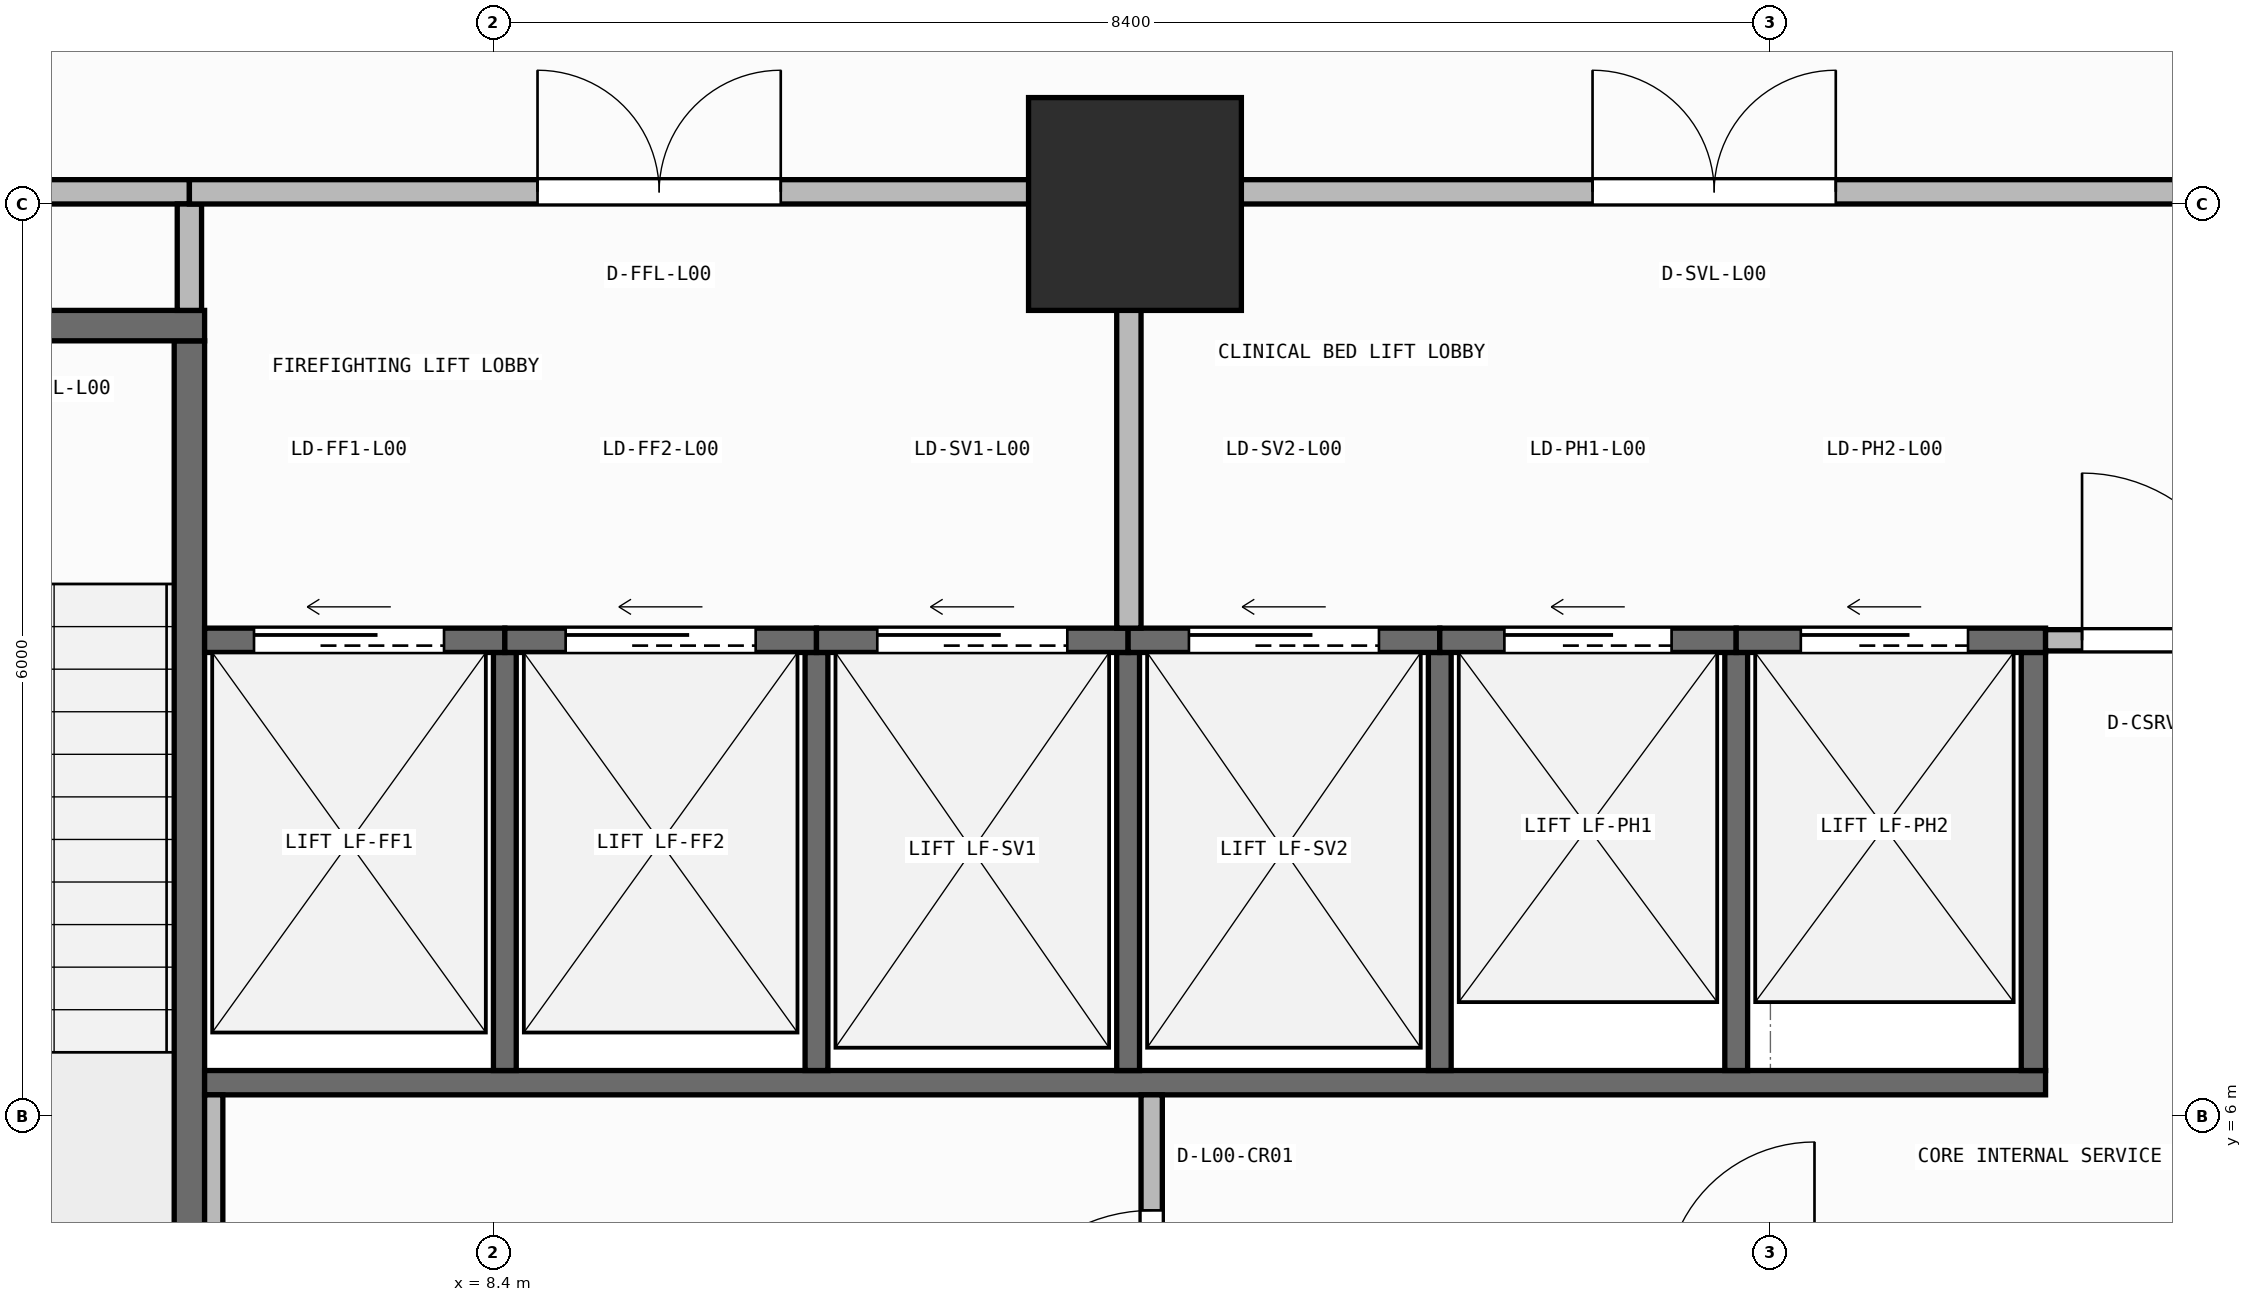
"""IFC4 building model, lengths in metres.
Left out: names, types, materials, properties, quantities, classifications, styles, units other than length and angle.
Written with IfcOpenShell. Run it as: python <this file> out.ifc"""

import sys

from ifc_helpers import new_model, si_unit, direction, frame, frame_2d, origin, origin_2d, place, context, subcontext, project, spatial, rectangle, extrude, element, fill, save


model = new_model("IFC4")
c1 = context("Model", 3, precision=1e-05, world=origin(), true_north=direction((0.0, 1.0)))
c2 = subcontext(c1, "Body", "Model", "MODEL_VIEW")
j1 = project(units=[si_unit("LENGTHUNIT", "METRE"), si_unit("PLANEANGLEUNIT", "RADIAN")], contexts=[c1])
p1 = place(None, origin())
s1 = spatial("IfcSite", under=j1, at=p1, CompositionType="ELEMENT")
p2 = place(p1, origin())
s2 = spatial("IfcBuilding", under=s1, at=p2, CompositionType="ELEMENT")
p3 = place(p2, origin())
s3 = spatial("IfcBuildingStorey", under=s2, at=p3, CompositionType="ELEMENT", Elevation=0.0)
p4 = place(p3, frame((12.62, 12.0, 0.0), z_axis=(0.0, 0.0, 1.0), x_axis=(1.0, 0.0, 0.0)))
e1 = element("IfcColumn", 1, at=p4, inside=s3, PredefinedType="COLUMN", context=c2, shape_type="SweptSolid", body=[
    extrude(rectangle(XDim=1.4, YDim=1.4, at=origin_2d()), origin(), (0.0, 0.0, 1.0), 4.5),
])
p5 = place(p3, frame((6.4, 3.5, 0.0), z_axis=(0.0, 0.0, 1.0), x_axis=(0.0, 1.0, 0.0)))
e2 = element("IfcWall", 2, at=p5, inside=s3, PredefinedType="SHEAR", context=c2, shape_type="SweptSolid", body=[
    extrude(rectangle(XDim=7.6, YDim=0.2, at=frame_2d((3.8, 0.0))), origin(), (0.0, 0.0, 1.0), 4.25),
])
p6 = place(p3, frame((2.8, 11.2, 0.0), z_axis=(0.0, 0.0, 1.0), x_axis=(1.0, 0.0, 0.0)))
e3 = element("IfcWall", 3, at=p6, inside=s3, PredefinedType="SHEAR", context=c2, shape_type="SweptSolid", body=[
    extrude(rectangle(XDim=3.7, YDim=0.2, at=frame_2d((1.85, 0.0))), origin(), (0.0, 0.0, 1.0), 4.25),
])
p7 = place(p6, frame((1.2, 0.0, 0.0)))
e4 = element("IfcOpeningElement", 4, at=p7, cuts=e3, PredefinedType="OPENING", context=c2, shape_type="SweptSolid", body=[
    extrude(rectangle(XDim=1.3, YDim=2.15, at=frame_2d((0.65, 1.075))), frame((0.0, 0.11, 0.0), z_axis=(0.0, -1.0, 0.0), x_axis=(1.0, 0.0, 0.0)), (0.0, 0.0, 1.0), 0.22),
])
p8 = place(p3, frame((6.5, 6.22, 0.0), z_axis=(0.0, 0.0, 1.0), x_axis=(1.0, 0.0, 0.0)))
e5 = element("IfcWall", 5, at=p8, inside=s3, PredefinedType="SHEAR", context=c2, shape_type="SweptSolid", body=[
    extrude(rectangle(XDim=12.11, YDim=0.16, at=frame_2d((6.055, 0.0))), origin(), (0.0, 0.0, 1.0), 4.25),
])
p9 = place(p3, frame((18.53, 6.3, 0.0), z_axis=(0.0, 0.0, 1.0), x_axis=(0.0, 1.0, 0.0)))
e6 = element("IfcWall", 6, at=p9, inside=s3, PredefinedType="SHEAR", context=c2, shape_type="SweptSolid", body=[
    extrude(rectangle(XDim=2.75, YDim=0.16, at=frame_2d((1.375, 0.0))), origin(), (0.0, 0.0, 1.0), 4.25),
])
for number, where, z_axis, x_axis in (
    (7, (8.475, 6.3, 0.0), (0.0, 0.0, 1.0), (0.0, 1.0, 0.0)),
    (8, (10.525, 6.3, 0.0), (0.0, 0.0, 1.0), (0.0, 1.0, 0.0)),
    (9, (12.575, 6.3, 0.0), (0.0, 0.0, 1.0), (0.0, 1.0, 0.0)),
    (10, (14.625, 6.3, 0.0), (0.0, 0.0, 1.0), (0.0, 1.0, 0.0)),
    (11, (16.575, 6.3, 0.0), (0.0, 0.0, 1.0), (0.0, 1.0, 0.0)),
):
    element("IfcWall", number, at=place(p3, frame(where, z_axis=z_axis, x_axis=x_axis)), inside=s3, PredefinedType="SHEAR", context=c2, shape_type="SweptSolid", body=[
        extrude(rectangle(XDim=2.75, YDim=0.15, at=frame_2d((1.375, 0.0))), origin(), (0.0, 0.0, 1.0), 4.25),
    ])
p10 = place(p3, frame((6.5, 9.13, 0.0), z_axis=(0.0, 0.0, 1.0), x_axis=(1.0, 0.0, 0.0)))
e12 = element("IfcWall", 12, at=p10, inside=s3, PredefinedType="SHEAR", context=c2, shape_type="SweptSolid", body=[
    extrude(rectangle(XDim=1.975, YDim=0.16, at=frame_2d((0.988, 0.0))), origin(), (0.0, 0.0, 1.0), 4.25),
])
p11 = place(p10, frame((0.325, 0.0, 0.0)))
e13 = element("IfcOpeningElement", 13, at=p11, cuts=e12, PredefinedType="OPENING", context=c2, shape_type="SweptSolid", body=[
    extrude(rectangle(XDim=1.25, YDim=2.15, at=frame_2d((0.625, 1.075))), frame((0.0, 0.09, 0.0), z_axis=(0.0, -1.0, 0.0), x_axis=(1.0, 0.0, 0.0)), (0.0, 0.0, 1.0), 0.18),
])
p12 = place(p3, frame((8.475, 9.13, 0.0), z_axis=(0.0, 0.0, 1.0), x_axis=(1.0, 0.0, 0.0)))
e14 = element("IfcWall", 14, at=p12, inside=s3, PredefinedType="SHEAR", context=c2, shape_type="SweptSolid", body=[
    extrude(rectangle(XDim=2.05, YDim=0.16, at=frame_2d((1.025, 0.0))), origin(), (0.0, 0.0, 1.0), 4.25),
])
p13 = place(p12, frame((0.4, 0.0, 0.0)))
e15 = element("IfcOpeningElement", 15, at=p13, cuts=e14, PredefinedType="OPENING", context=c2, shape_type="SweptSolid", body=[
    extrude(rectangle(XDim=1.25, YDim=2.15, at=frame_2d((0.625, 1.075))), frame((0.0, 0.09, 0.0), z_axis=(0.0, -1.0, 0.0), x_axis=(1.0, 0.0, 0.0)), (0.0, 0.0, 1.0), 0.18),
])
p14 = place(p3, frame((10.525, 9.13, 0.0), z_axis=(0.0, 0.0, 1.0), x_axis=(1.0, 0.0, 0.0)))
e16 = element("IfcWall", 16, at=p14, inside=s3, PredefinedType="SHEAR", context=c2, shape_type="SweptSolid", body=[
    extrude(rectangle(XDim=2.05, YDim=0.16, at=frame_2d((1.025, 0.0))), origin(), (0.0, 0.0, 1.0), 4.25),
])
p15 = place(p14, frame((0.4, 0.0, 0.0)))
e17 = element("IfcOpeningElement", 17, at=p15, cuts=e16, PredefinedType="OPENING", context=c2, shape_type="SweptSolid", body=[
    extrude(rectangle(XDim=1.25, YDim=2.15, at=frame_2d((0.625, 1.075))), frame((0.0, 0.09, 0.0), z_axis=(0.0, -1.0, 0.0), x_axis=(1.0, 0.0, 0.0)), (0.0, 0.0, 1.0), 0.18),
])
p16 = place(p3, frame((12.575, 9.13, 0.0), z_axis=(0.0, 0.0, 1.0), x_axis=(1.0, 0.0, 0.0)))
e18 = element("IfcWall", 18, at=p16, inside=s3, PredefinedType="SHEAR", context=c2, shape_type="SweptSolid", body=[
    extrude(rectangle(XDim=2.05, YDim=0.16, at=frame_2d((1.025, 0.0))), origin(), (0.0, 0.0, 1.0), 4.25),
])
p17 = place(p16, frame((0.4, 0.0, 0.0)))
e19 = element("IfcOpeningElement", 19, at=p17, cuts=e18, PredefinedType="OPENING", context=c2, shape_type="SweptSolid", body=[
    extrude(rectangle(XDim=1.25, YDim=2.15, at=frame_2d((0.625, 1.075))), frame((0.0, 0.09, 0.0), z_axis=(0.0, -1.0, 0.0), x_axis=(1.0, 0.0, 0.0)), (0.0, 0.0, 1.0), 0.18),
])
p18 = place(p3, frame((14.625, 9.13, 0.0), z_axis=(0.0, 0.0, 1.0), x_axis=(1.0, 0.0, 0.0)))
e20 = element("IfcWall", 20, at=p18, inside=s3, PredefinedType="SHEAR", context=c2, shape_type="SweptSolid", body=[
    extrude(rectangle(XDim=1.95, YDim=0.16, at=frame_2d((0.975, 0.0))), origin(), (0.0, 0.0, 1.0), 4.25),
])
p19 = place(p18, frame((0.425, 0.0, 0.0)))
e21 = element("IfcOpeningElement", 21, at=p19, cuts=e20, PredefinedType="OPENING", context=c2, shape_type="SweptSolid", body=[
    extrude(rectangle(XDim=1.1, YDim=2.15, at=frame_2d((0.55, 1.075))), frame((0.0, 0.09, 0.0), z_axis=(0.0, -1.0, 0.0), x_axis=(1.0, 0.0, 0.0)), (0.0, 0.0, 1.0), 0.18),
])
p20 = place(p3, frame((16.575, 9.13, 0.0), z_axis=(0.0, 0.0, 1.0), x_axis=(1.0, 0.0, 0.0)))
e22 = element("IfcWall", 22, at=p20, inside=s3, PredefinedType="SHEAR", context=c2, shape_type="SweptSolid", body=[
    extrude(rectangle(XDim=2.035, YDim=0.16, at=frame_2d((1.018, 0.0))), origin(), (0.0, 0.0, 1.0), 4.25),
])
p21 = place(p20, frame((0.425, 0.0, 0.0)))
e23 = element("IfcOpeningElement", 23, at=p21, cuts=e22, PredefinedType="OPENING", context=c2, shape_type="SweptSolid", body=[
    extrude(rectangle(XDim=1.1, YDim=2.15, at=frame_2d((0.55, 1.075))), frame((0.0, 0.09, 0.0), z_axis=(0.0, -1.0, 0.0), x_axis=(1.0, 0.0, 0.0)), (0.0, 0.0, 1.0), 0.18),
])
p22 = place(p3, frame((6.56, 3.52, 0.0), z_axis=(0.0, 0.0, 1.0), x_axis=(0.0, 1.0, 0.0)))
e24 = element("IfcWall", 24, at=p22, inside=s3, PredefinedType="PARTITIONING", context=c2, shape_type="SweptSolid", body=[
    extrude(rectangle(XDim=2.62, YDim=0.12, at=frame_2d((1.31, 0.0))), origin(), (0.0, 0.0, 1.0), 4.25),
])
p23 = place(p3, frame((12.73, 3.52, 0.0), z_axis=(0.0, 0.0, 1.0), x_axis=(0.0, 1.0, 0.0)))
e25 = element("IfcWall", 25, at=p23, inside=s3, PredefinedType="PARTITIONING", context=c2, shape_type="SweptSolid", body=[
    extrude(rectangle(XDim=2.62, YDim=0.14, at=frame_2d((1.31, 0.0))), origin(), (0.0, 0.0, 1.0), 4.25),
])
p24 = place(p23, frame((0.76, 0.0, 0.0)))
e26 = element("IfcOpeningElement", 26, at=p24, cuts=e25, PredefinedType="OPENING", context=c2, shape_type="SweptSolid", body=[
    extrude(rectangle(XDim=1.1, YDim=2.1, at=frame_2d((0.55, 1.05))), frame((0.0, 0.08, 0.0), z_axis=(0.0, -1.0, 0.0), x_axis=(1.0, 0.0, 0.0)), (0.0, 0.0, 1.0), 0.16),
])
p25 = place(p3, frame((18.61, 9.13, 0.0), z_axis=(0.0, 0.0, 1.0), x_axis=(1.0, 0.0, 0.0)))
e27 = element("IfcWall", 27, at=p25, inside=s3, PredefinedType="PARTITIONING", context=c2, shape_type="SweptSolid", body=[
    extrude(rectangle(XDim=1.59, YDim=0.14, at=frame_2d((0.795, 0.0))), origin(), (0.0, 0.0, 1.0), 4.25),
])
p26 = place(p25, frame((0.24, 0.0, 0.0)))
e28 = element("IfcOpeningElement", 28, at=p26, cuts=e27, PredefinedType="OPENING", context=c2, shape_type="SweptSolid", body=[
    extrude(rectangle(XDim=1.1, YDim=2.1, at=frame_2d((0.55, 1.05))), frame((0.0, 0.08, 0.0), z_axis=(0.0, -1.0, 0.0), x_axis=(1.0, 0.0, 0.0)), (0.0, 0.0, 1.0), 0.16),
])
p27 = place(p3, frame((2.8, 12.08, 0.0), z_axis=(0.0, 0.0, 1.0), x_axis=(1.0, 0.0, 0.0)))
e29 = element("IfcWall", 29, at=p27, inside=s3, PredefinedType="PARTITIONING", context=c2, shape_type="SweptSolid", body=[
    extrude(rectangle(XDim=3.6, YDim=0.16, at=frame_2d((1.8, 0.0))), origin(), (0.0, 0.0, 1.0), 3.425),
])
p28 = place(p27, frame((1.0, 0.0, 0.0)))
e30 = element("IfcOpeningElement", 30, at=p28, cuts=e29, PredefinedType="OPENING", context=c2, shape_type="SweptSolid", body=[
    extrude(rectangle(XDim=1.6, YDim=2.05, at=frame_2d((0.8, 1.025))), frame((0.0, 0.09, 0.0), z_axis=(0.0, -1.0, 0.0), x_axis=(1.0, 0.0, 0.0)), (0.0, 0.0, 1.0), 0.18),
])
p29 = place(p3, frame((6.4, 11.3, 0.0), z_axis=(0.0, 0.0, 1.0), x_axis=(0.0, 1.0, 0.0)))
e31 = element("IfcWall", 31, at=p29, inside=s3, PredefinedType="PARTITIONING", context=c2, shape_type="SweptSolid", body=[
    extrude(rectangle(XDim=0.7, YDim=0.16, at=frame_2d((0.35, 0.0))), origin(), (0.0, 0.0, 1.0), 4.25),
])
p30 = place(p3, frame((6.4, 12.08, 0.0), z_axis=(0.0, 0.0, 1.0), x_axis=(1.0, 0.0, 0.0)))
e32 = element("IfcWall", 32, at=p30, inside=s3, PredefinedType="PARTITIONING", context=c2, shape_type="SweptSolid", body=[
    extrude(rectangle(XDim=6.18, YDim=0.16, at=frame_2d((3.09, 0.0))), origin(), (0.0, 0.0, 1.0), 3.425),
])
p31 = place(p30, frame((2.29, 0.0, 0.0)))
e33 = element("IfcOpeningElement", 33, at=p31, cuts=e32, PredefinedType="OPENING", context=c2, shape_type="SweptSolid", body=[
    extrude(rectangle(XDim=1.6, YDim=2.05, at=frame_2d((0.8, 1.025))), frame((0.0, 0.09, 0.0), z_axis=(0.0, -1.0, 0.0), x_axis=(1.0, 0.0, 0.0)), (0.0, 0.0, 1.0), 0.18),
])
p32 = place(p3, frame((12.58, 9.21, 0.0), z_axis=(0.0, 0.0, 1.0), x_axis=(0.0, 1.0, 0.0)))
e34 = element("IfcWall", 34, at=p32, inside=s3, PredefinedType="PARTITIONING", context=c2, shape_type="SweptSolid", body=[
    extrude(rectangle(XDim=2.79, YDim=0.16, at=frame_2d((1.395, 0.0))), origin(), (0.0, 0.0, 1.0), 4.25),
])
p33 = place(p3, frame((12.58, 12.08, 0.0), z_axis=(0.0, 0.0, 1.0), x_axis=(1.0, 0.0, 0.0)))
e35 = element("IfcWall", 35, at=p33, inside=s3, PredefinedType="PARTITIONING", context=c2, shape_type="SweptSolid", body=[
    extrude(rectangle(XDim=7.7, YDim=0.16, at=frame_2d((3.85, 0.0))), origin(), (0.0, 0.0, 1.0), 3.425),
])
p34 = place(p33, frame((3.05, 0.0, 0.0)))
e36 = element("IfcOpeningElement", 36, at=p34, cuts=e35, PredefinedType="OPENING", context=c2, shape_type="SweptSolid", body=[
    extrude(rectangle(XDim=1.6, YDim=2.05, at=frame_2d((0.8, 1.025))), frame((0.0, 0.09, 0.0), z_axis=(0.0, -1.0, 0.0), x_axis=(1.0, 0.0, 0.0)), (0.0, 0.0, 1.0), 0.18),
])
p35 = place(p11, origin())
e37 = element("IfcDoor", 37, at=p35, inside=s3, OperationType="SLIDING_TO_LEFT", PredefinedType="DOOR", context=c2, shape_type="SweptSolid", body=[
    extrude(rectangle(XDim=1.25, YDim=2.15, at=frame_2d((0.625, 1.075))), frame((0.0, 0.025, 0.0), z_axis=(0.0, -1.0, 0.0), x_axis=(1.0, 0.0, 0.0)), (0.0, 0.0, 1.0), 0.05),
])
fill(e13, e37)
p36 = place(p13, origin())
e38 = element("IfcDoor", 38, at=p36, inside=s3, OperationType="SLIDING_TO_LEFT", PredefinedType="DOOR", context=c2, shape_type="SweptSolid", body=[
    extrude(rectangle(XDim=1.25, YDim=2.15, at=frame_2d((0.625, 1.075))), frame((0.0, 0.025, 0.0), z_axis=(0.0, -1.0, 0.0), x_axis=(1.0, 0.0, 0.0)), (0.0, 0.0, 1.0), 0.05),
])
fill(e15, e38)
p37 = place(p15, origin())
e39 = element("IfcDoor", 39, at=p37, inside=s3, OperationType="SLIDING_TO_LEFT", PredefinedType="DOOR", context=c2, shape_type="SweptSolid", body=[
    extrude(rectangle(XDim=1.25, YDim=2.15, at=frame_2d((0.625, 1.075))), frame((0.0, 0.025, 0.0), z_axis=(0.0, -1.0, 0.0), x_axis=(1.0, 0.0, 0.0)), (0.0, 0.0, 1.0), 0.05),
])
fill(e17, e39)
p38 = place(p17, origin())
e40 = element("IfcDoor", 40, at=p38, inside=s3, OperationType="SLIDING_TO_LEFT", PredefinedType="DOOR", context=c2, shape_type="SweptSolid", body=[
    extrude(rectangle(XDim=1.25, YDim=2.15, at=frame_2d((0.625, 1.075))), frame((0.0, 0.025, 0.0), z_axis=(0.0, -1.0, 0.0), x_axis=(1.0, 0.0, 0.0)), (0.0, 0.0, 1.0), 0.05),
])
fill(e19, e40)
p39 = place(p19, origin())
e41 = element("IfcDoor", 41, at=p39, inside=s3, OperationType="SLIDING_TO_LEFT", PredefinedType="DOOR", context=c2, shape_type="SweptSolid", body=[
    extrude(rectangle(XDim=1.1, YDim=2.15, at=frame_2d((0.55, 1.075))), frame((0.0, 0.025, 0.0), z_axis=(0.0, -1.0, 0.0), x_axis=(1.0, 0.0, 0.0)), (0.0, 0.0, 1.0), 0.05),
])
fill(e21, e41)
p40 = place(p21, origin())
e42 = element("IfcDoor", 42, at=p40, inside=s3, OperationType="SLIDING_TO_LEFT", PredefinedType="DOOR", context=c2, shape_type="SweptSolid", body=[
    extrude(rectangle(XDim=1.1, YDim=2.15, at=frame_2d((0.55, 1.075))), frame((0.0, 0.025, 0.0), z_axis=(0.0, -1.0, 0.0), x_axis=(1.0, 0.0, 0.0)), (0.0, 0.0, 1.0), 0.05),
])
fill(e23, e42)
p41 = place(p24, origin())
e43 = element("IfcDoor", 43, at=p41, inside=s3, OperationType="SINGLE_SWING_LEFT", PredefinedType="DOOR", context=c2, shape_type="SweptSolid", body=[
    extrude(rectangle(XDim=1.1, YDim=2.1, at=frame_2d((0.55, 1.05))), frame((0.0, 0.025, 0.0), z_axis=(0.0, -1.0, 0.0), x_axis=(1.0, 0.0, 0.0)), (0.0, 0.0, 1.0), 0.05),
])
fill(e26, e43)
p42 = place(p26, origin())
e44 = element("IfcDoor", 44, at=p42, inside=s3, OperationType="SINGLE_SWING_LEFT", PredefinedType="DOOR", context=c2, shape_type="SweptSolid", body=[
    extrude(rectangle(XDim=1.1, YDim=2.1, at=frame_2d((0.55, 1.05))), frame((0.0, 0.025, 0.0), z_axis=(0.0, -1.0, 0.0), x_axis=(1.0, 0.0, 0.0)), (0.0, 0.0, 1.0), 0.05),
])
fill(e28, e44)
p43 = place(p31, origin())
e45 = element("IfcDoor", 45, at=p43, inside=s3, OperationType="DOUBLE_DOOR_SINGLE_SWING", PredefinedType="DOOR", context=c2, shape_type="SweptSolid", body=[
    extrude(rectangle(XDim=1.6, YDim=2.05, at=frame_2d((0.8, 1.025))), frame((0.0, 0.025, 0.0), z_axis=(0.0, -1.0, 0.0), x_axis=(1.0, 0.0, 0.0)), (0.0, 0.0, 1.0), 0.05),
])
fill(e33, e45)
p44 = place(p34, origin())
e46 = element("IfcDoor", 46, at=p44, inside=s3, OperationType="DOUBLE_DOOR_SINGLE_SWING", PredefinedType="DOOR", context=c2, shape_type="SweptSolid", body=[
    extrude(rectangle(XDim=1.6, YDim=2.05, at=frame_2d((0.8, 1.025))), frame((0.0, 0.025, 0.0), z_axis=(0.0, -1.0, 0.0), x_axis=(1.0, 0.0, 0.0)), (0.0, 0.0, 1.0), 0.05),
])
fill(e36, e46)
save(model, sys.argv[1])
